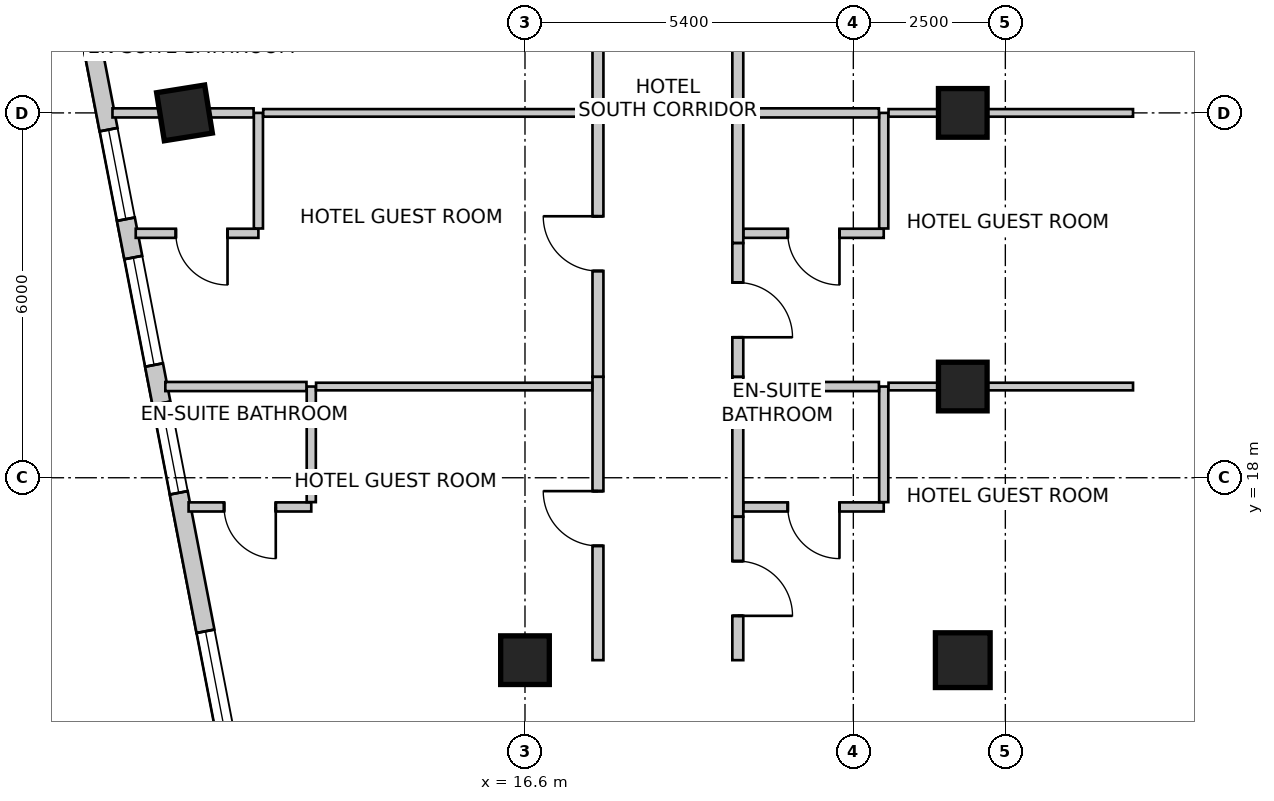
"""IFC4 building model, lengths in metres.
Left out: names, types, materials, properties, quantities, classifications, styles, units other than length and angle.
Written with IfcOpenShell. Run it as: python <this file> out.ifc"""

import sys

from ifc_helpers import new_model, si_unit, direction, frame, frame_2d, origin, origin_2d, place, context, subcontext, project, spatial, rectangle, extrude, source, transform, mapped, element, fill, save


model = new_model("IFC4")
c1 = context("Model", 3, precision=1e-05, world=origin(), true_north=direction((0.0, 1.0)))
c2 = subcontext(c1, "Body", "Model", "MODEL_VIEW")
j1 = project(units=[si_unit("LENGTHUNIT", "METRE"), si_unit("PLANEANGLEUNIT", "RADIAN")], contexts=[c1])
p1 = place(None, origin())
s1 = spatial("IfcSite", under=j1, at=p1, CompositionType="ELEMENT")
p2 = place(p1, origin())
s2 = spatial("IfcBuilding", under=s1, at=p2, CompositionType="ELEMENT")
p3 = place(p2, frame((0.0, 0.0, 128.6)))
s3 = spatial("IfcBuildingStorey", under=s2, at=p3, CompositionType="ELEMENT", Elevation=128.6)
m1 = source(origin(), c2, "Body", "SweptSolid", [
    extrude(rectangle(XDim=0.8, YDim=0.8, at=origin_2d()), origin(), (0.0, 0.0, 1.0), 3.6),
])
for number, where, z_axis, x_axis in (
    (1, (11.0, 24.0, 0.0), (0.0, 0.0, 1.0), (0.158, -0.987, 0.0)),
    (2, (23.8, 24.0, 0.0), (0.0, 0.0, 1.0), (1.0, 0.0, 0.0)),
    (3, (23.8, 19.5, 0.0), (0.0, 0.0, 1.0), (1.0, 0.0, 0.0)),
):
    element("IfcColumn", number, at=place(p3, frame(where, z_axis=z_axis, x_axis=x_axis)), inside=s3, PredefinedType="COLUMN", context=c2, shape_type="MappedRepresentation", body=[
        mapped(m1, transform((0.0, 0.0, 0.0), scale=1.0)),
    ])
m2 = source(origin(), c2, "Body", "SweptSolid", [
    extrude(rectangle(XDim=0.9, YDim=0.9, at=origin_2d()), origin(), (0.0, 0.0, 1.0), 3.6),
])
p4 = place(p3, frame((23.8, 15.0, 0.0), z_axis=(0.0, 0.0, 1.0), x_axis=(1.0, 0.0, 0.0)))
e4 = element("IfcColumn", 4, at=p4, inside=s3, PredefinedType="COLUMN", context=c2, shape_type="MappedRepresentation", body=[
    mapped(m2, transform((0.0, 0.0, 0.0), scale=1.0)),
])
p5 = place(p3, frame((16.6, 15.0, 0.0), z_axis=(0.0, 0.0, 1.0), x_axis=(1.0, 0.0, 0.0)))
e5 = element("IfcColumn", 5, at=p5, inside=s3, PredefinedType="COLUMN", context=c2, shape_type="MappedRepresentation", body=[
    mapped(m1, transform((0.0, 0.0, 0.0), scale=1.0)),
])
p6 = place(p3, frame((8.185, 31.834, 0.0), z_axis=(0.0, 0.0, 1.0), x_axis=(0.189707113148, -0.981840725994, 0.0)))
e6 = element("IfcWall", 6, at=p6, inside=s3, PredefinedType="SOLIDWALL", context=c2, shape_type="SweptSolid", body=[
    extrude(rectangle(XDim=21.221, YDim=0.3, at=frame_2d((10.611, 0.0))), origin(), (0.0, 0.0, 1.0), 3.35),
])
m3 = source(origin(), c2, "Body", "SweptSolid", [
    extrude(rectangle(XDim=1.5, YDim=1.8, at=frame_2d((0.75, 0.9))), frame((0.0, 0.16, 0.0), z_axis=(0.0, -1.0, 0.0), x_axis=(1.0, 0.0, 0.0)), (0.0, 0.0, 1.0), 0.32),
])
p7 = place(p6, frame((0.977, 0.0, 0.85)))
e7 = element("IfcOpeningElement", 7, at=p7, cuts=e6, PredefinedType="OPENING", context=c2, shape_type="MappedRepresentation", body=[
    mapped(m3, transform((0.0, 0.0, 0.0), scale=1.0)),
])
m4 = source(origin(), c2, "Body", "SweptSolid", [
    extrude(rectangle(XDim=2.4, YDim=2.2, at=frame_2d((1.2, 1.1))), frame((0.0, 0.16, 0.0), z_axis=(0.0, -1.0, 0.0), x_axis=(1.0, 0.0, 0.0)), (0.0, 0.0, 1.0), 0.32),
])
p8 = place(p6, frame((4.219, 0.0, 0.85)))
e8 = element("IfcOpeningElement", 8, at=p8, cuts=e6, PredefinedType="OPENING", context=c2, shape_type="MappedRepresentation", body=[
    mapped(m4, transform((0.0, 0.0, 0.0), scale=1.0)),
])
p9 = place(p6, frame((8.259, 0.0, 0.85)))
e9 = element("IfcOpeningElement", 9, at=p9, cuts=e6, PredefinedType="OPENING", context=c2, shape_type="MappedRepresentation", body=[
    mapped(m3, transform((0.0, 0.0, 0.0), scale=1.0)),
])
m5 = source(origin(), c2, "Body", "SweptSolid", [
    extrude(rectangle(XDim=1.8, YDim=2.1, at=frame_2d((0.9, 1.05))), frame((0.0, 0.16, 0.0), z_axis=(0.0, -1.0, 0.0), x_axis=(1.0, 0.0, 0.0)), (0.0, 0.0, 1.0), 0.32),
])
p10 = place(p6, frame((10.401, 0.0, 0.85)))
e10 = element("IfcOpeningElement", 10, at=p10, cuts=e6, PredefinedType="OPENING", context=c2, shape_type="MappedRepresentation", body=[
    mapped(m5, transform((0.0, 0.0, 0.0), scale=1.0)),
])
p11 = place(p6, frame((12.842, 0.0, 0.85)))
e11 = element("IfcOpeningElement", 11, at=p11, cuts=e6, PredefinedType="OPENING", context=c2, shape_type="MappedRepresentation", body=[
    mapped(m3, transform((0.0, 0.0, 0.0), scale=1.0)),
])
p12 = place(p6, frame((16.661, 0.0, 0.85)))
e12 = element("IfcOpeningElement", 12, at=p12, cuts=e6, PredefinedType="OPENING", context=c2, shape_type="MappedRepresentation", body=[
    mapped(m4, transform((0.0, 0.0, 0.0), scale=1.0)),
])
p13 = place(p3, frame((17.8, 15.0, 0.0), z_axis=(0.0, 0.0, 1.0), x_axis=(0.0, 1.0, 0.0)))
e13 = element("IfcWall", 13, at=p13, inside=s3, PredefinedType="PARTITIONING", context=c2, shape_type="SweptSolid", body=[
    extrude(rectangle(XDim=4.66, YDim=0.18, at=frame_2d((2.33, 0.0))), origin(), (0.0, 0.0, 1.0), 2.492),
])
m6 = source(origin(), c2, "Body", "SweptSolid", [
    extrude(rectangle(XDim=0.9, YDim=2.15, at=frame_2d((0.45, 1.075))), frame((0.0, 0.1, 0.0), z_axis=(0.0, -1.0, 0.0), x_axis=(1.0, 0.0, 0.0)), (0.0, 0.0, 1.0), 0.2),
])
p14 = place(p13, frame((1.88, 0.0, 0.0)))
e14 = element("IfcOpeningElement", 14, at=p14, cuts=e13, PredefinedType="OPENING", context=c2, shape_type="MappedRepresentation", body=[
    mapped(m6, transform((0.0, 0.0, 0.0), scale=1.0)),
])
p15 = place(p3, frame((20.1, 19.66, 0.0), z_axis=(0.0, 0.0, 1.0), x_axis=(0.0, -1.0, 0.0)))
e15 = element("IfcWall", 15, at=p15, inside=s3, PredefinedType="PARTITIONING", context=c2, shape_type="SweptSolid", body=[
    extrude(rectangle(XDim=2.3, YDim=0.18, at=frame_2d((1.15, 0.0))), origin(), (0.0, 0.0, 1.0), 3.35),
])
p16 = place(p3, frame((20.1, 17.358, 0.0), z_axis=(0.0, 0.0, 1.0), x_axis=(0.0, -1.0, 0.0)))
e16 = element("IfcWall", 16, at=p16, inside=s3, PredefinedType="PARTITIONING", context=c2, shape_type="SweptSolid", body=[
    extrude(rectangle(XDim=2.358, YDim=0.18, at=frame_2d((1.179, 0.0))), origin(), (0.0, 0.0, 1.0), 2.492),
])
p17 = place(p16, frame((0.729, 0.0, 0.0)))
e17 = element("IfcOpeningElement", 17, at=p17, cuts=e16, PredefinedType="OPENING", context=c2, shape_type="MappedRepresentation", body=[
    mapped(m6, transform((0.0, 0.0, 0.0), scale=1.0)),
])
p18 = place(p3, frame((17.8, 19.662, 0.0), z_axis=(0.0, 0.0, 1.0), x_axis=(0.0, 1.0, 0.0)))
e18 = element("IfcWall", 18, at=p18, inside=s3, PredefinedType="PARTITIONING", context=c2, shape_type="SweptSolid", body=[
    extrude(rectangle(XDim=4.498, YDim=0.18, at=frame_2d((2.249, 0.0))), origin(), (0.0, 0.0, 1.0), 2.803),
])
p19 = place(p18, frame((1.738, 0.0, 0.0)))
e19 = element("IfcOpeningElement", 19, at=p19, cuts=e18, PredefinedType="OPENING", context=c2, shape_type="MappedRepresentation", body=[
    mapped(m6, transform((0.0, 0.0, 0.0), scale=1.0)),
])
p20 = place(p3, frame((20.1, 24.16, 0.0), z_axis=(0.0, 0.0, 1.0), x_axis=(0.0, -1.0, 0.0)))
e20 = element("IfcWall", 20, at=p20, inside=s3, PredefinedType="PARTITIONING", context=c2, shape_type="SweptSolid", body=[
    extrude(rectangle(XDim=2.3, YDim=0.18, at=frame_2d((1.15, 0.0))), origin(), (0.0, 0.0, 1.0), 2.803),
])
p21 = place(p3, frame((20.1, 21.858, 0.0), z_axis=(0.0, 0.0, 1.0), x_axis=(0.0, -1.0, 0.0)))
e21 = element("IfcWall", 21, at=p21, inside=s3, PredefinedType="PARTITIONING", context=c2, shape_type="SweptSolid", body=[
    extrude(rectangle(XDim=2.196, YDim=0.18, at=frame_2d((1.098, 0.0))), origin(), (0.0, 0.0, 1.0), 2.879),
])
p22 = place(p21, frame((0.648, 0.0, 0.0)))
e22 = element("IfcOpeningElement", 22, at=p22, cuts=e21, PredefinedType="OPENING", context=c2, shape_type="MappedRepresentation", body=[
    mapped(m6, transform((0.0, 0.0, 0.0), scale=1.0)),
])
p23 = place(p3, frame((17.8, 24.162, 0.0), z_axis=(0.0, 0.0, 1.0), x_axis=(0.0, 1.0, 0.0)))
e23 = element("IfcWall", 23, at=p23, inside=s3, PredefinedType="PARTITIONING", context=c2, shape_type="SweptSolid", body=[
    extrude(rectangle(XDim=6.994, YDim=0.18, at=frame_2d((3.497, 0.0))), origin(), (0.0, 0.0, 1.0), 2.803),
])
p24 = place(p23, frame((3.047, 0.0, 0.0)))
e24 = element("IfcOpeningElement", 24, at=p24, cuts=e23, PredefinedType="OPENING", context=c2, shape_type="MappedRepresentation", body=[
    mapped(m6, transform((0.0, 0.0, 0.0), scale=1.0)),
])
p25 = place(p3, frame((20.1, 28.888, 0.0), z_axis=(0.0, 0.0, 1.0), x_axis=(0.0, -1.0, 0.0)))
e25 = element("IfcWall", 25, at=p25, inside=s3, PredefinedType="PARTITIONING", context=c2, shape_type="SweptSolid", body=[
    extrude(rectangle(XDim=4.726, YDim=0.18, at=frame_2d((2.363, 0.0))), origin(), (0.0, 0.0, 1.0), 2.803),
])
p26 = place(p25, frame((1.853, 0.0, 0.0)))
e26 = element("IfcOpeningElement", 26, at=p26, cuts=e25, PredefinedType="OPENING", context=c2, shape_type="MappedRepresentation", body=[
    mapped(m6, transform((0.0, 0.0, 0.0), scale=1.0)),
])
p27 = place(p3, frame((13.085, 17.52, 0.0), z_axis=(0.0, 0.0, 1.0), x_axis=(-1.0, 0.0, 0.0)))
e27 = element("IfcWall", 27, at=p27, inside=s3, PredefinedType="PARTITIONING", context=c2, shape_type="SweptSolid", body=[
    extrude(rectangle(XDim=2.018, YDim=0.15, at=frame_2d((1.009, 0.0))), origin(), (0.0, 0.0, 1.0), 3.35),
])
m7 = source(origin(), c2, "Body", "SweptSolid", [
    extrude(rectangle(XDim=0.85, YDim=2.15, at=frame_2d((0.425, 1.075))), frame((0.0, 0.085, 0.0), z_axis=(0.0, -1.0, 0.0), x_axis=(1.0, 0.0, 0.0)), (0.0, 0.0, 1.0), 0.17),
])
p28 = place(p27, frame((0.584, 0.0, 0.0)))
e28 = element("IfcOpeningElement", 28, at=p28, cuts=e27, PredefinedType="OPENING", context=c2, shape_type="MappedRepresentation", body=[
    mapped(m7, transform((0.0, 0.0, 0.0), scale=1.0)),
])
p29 = place(p3, frame((13.085, 19.5, 0.0), z_axis=(0.0, 0.0, 1.0), x_axis=(0.0, -1.0, 0.0)))
e29 = element("IfcWall", 29, at=p29, inside=s3, PredefinedType="PARTITIONING", context=c2, shape_type="SweptSolid", body=[
    extrude(rectangle(XDim=1.901, YDim=0.15, at=frame_2d((0.95, 0.0))), origin(), (0.0, 0.0, 1.0), 3.35),
])
p30 = place(p3, frame((10.685, 19.5, 0.0), z_axis=(0.0, 0.0, 1.0), x_axis=(1.0, 0.0, 0.0)))
e30 = element("IfcWall", 30, at=p30, inside=s3, PredefinedType="PARTITIONING", context=c2, shape_type="SweptSolid", body=[
    extrude(rectangle(XDim=2.321, YDim=0.15, at=frame_2d((1.161, 0.0))), origin(), (0.0, 0.0, 1.0), 3.35),
])
p31 = place(p3, frame((13.164, 19.5, 0.0), z_axis=(0.0, 0.0, 1.0), x_axis=(1.0, 0.0, 0.0)))
e31 = element("IfcWall", 31, at=p31, inside=s3, PredefinedType="PARTITIONING", context=c2, shape_type="SweptSolid", body=[
    extrude(rectangle(XDim=4.542, YDim=0.125, at=frame_2d((2.271, 0.0))), origin(), (0.0, 0.0, 1.0), 3.35),
])
p32 = place(p3, frame((22.5, 17.52, 0.0), z_axis=(0.0, 0.0, 1.0), x_axis=(-1.0, 0.0, 0.0)))
e32 = element("IfcWall", 32, at=p32, inside=s3, PredefinedType="PARTITIONING", context=c2, shape_type="SweptSolid", body=[
    extrude(rectangle(XDim=2.306, YDim=0.15, at=frame_2d((1.153, 0.0))), origin(), (0.0, 0.0, 1.0), 2.879),
])
p33 = place(p32, frame((0.728, 0.0, 0.0)))
e33 = element("IfcOpeningElement", 33, at=p33, cuts=e32, PredefinedType="OPENING", context=c2, shape_type="MappedRepresentation", body=[
    mapped(m7, transform((0.0, 0.0, 0.0), scale=1.0)),
])
p34 = place(p3, frame((22.5, 19.5, 0.0), z_axis=(0.0, 0.0, 1.0), x_axis=(0.0, -1.0, 0.0)))
e34 = element("IfcWall", 34, at=p34, inside=s3, PredefinedType="PARTITIONING", context=c2, shape_type="SweptSolid", body=[
    extrude(rectangle(XDim=1.901, YDim=0.15, at=frame_2d((0.95, 0.0))), origin(), (0.0, 0.0, 1.0), 2.879),
])
p35 = place(p3, frame((20.194, 19.5, 0.0), z_axis=(0.0, 0.0, 1.0), x_axis=(1.0, 0.0, 0.0)))
e35 = element("IfcWall", 35, at=p35, inside=s3, PredefinedType="PARTITIONING", context=c2, shape_type="SweptSolid", body=[
    extrude(rectangle(XDim=2.227, YDim=0.15, at=frame_2d((1.113, 0.0))), origin(), (0.0, 0.0, 1.0), 3.35),
])
p36 = place(p3, frame((22.579, 19.5, 0.0), z_axis=(0.0, 0.0, 1.0), x_axis=(1.0, 0.0, 0.0)))
e36 = element("IfcWall", 36, at=p36, inside=s3, PredefinedType="PARTITIONING", context=c2, shape_type="SweptSolid", body=[
    extrude(rectangle(XDim=4.021, YDim=0.125, at=frame_2d((2.01, 0.0))), origin(), (0.0, 0.0, 1.0), 2.492),
])
p37 = place(p3, frame((12.216, 22.02, 0.0), z_axis=(0.0, 0.0, 1.0), x_axis=(-1.0, 0.0, 0.0)))
e37 = element("IfcWall", 37, at=p37, inside=s3, PredefinedType="PARTITIONING", context=c2, shape_type="SweptSolid", body=[
    extrude(rectangle(XDim=2.018, YDim=0.15, at=frame_2d((1.009, 0.0))), origin(), (0.0, 0.0, 1.0), 3.35),
])
p38 = place(p37, frame((0.508, 0.0, 0.0)))
e38 = element("IfcOpeningElement", 38, at=p38, cuts=e37, PredefinedType="OPENING", context=c2, shape_type="MappedRepresentation", body=[
    mapped(m7, transform((0.0, 0.0, 0.0), scale=1.0)),
])
p39 = place(p3, frame((12.216, 24.0, 0.0), z_axis=(0.0, 0.0, 1.0), x_axis=(0.0, -1.0, 0.0)))
e39 = element("IfcWall", 39, at=p39, inside=s3, PredefinedType="PARTITIONING", context=c2, shape_type="SweptSolid", body=[
    extrude(rectangle(XDim=1.901, YDim=0.15, at=frame_2d((0.95, 0.0))), origin(), (0.0, 0.0, 1.0), 2.803),
])
p40 = place(p3, frame((9.816, 24.0, 0.0), z_axis=(0.0, 0.0, 1.0), x_axis=(1.0, 0.0, 0.0)))
e40 = element("IfcWall", 40, at=p40, inside=s3, PredefinedType="PARTITIONING", context=c2, shape_type="SweptSolid", body=[
    extrude(rectangle(XDim=2.321, YDim=0.15, at=frame_2d((1.161, 0.0))), origin(), (0.0, 0.0, 1.0), 2.492),
])
p41 = place(p3, frame((12.295, 24.0, 0.0), z_axis=(0.0, 0.0, 1.0), x_axis=(1.0, 0.0, 0.0)))
e41 = element("IfcWall", 41, at=p41, inside=s3, PredefinedType="PARTITIONING", context=c2, shape_type="SweptSolid", body=[
    extrude(rectangle(XDim=5.411, YDim=0.125, at=frame_2d((2.706, 0.0))), origin(), (0.0, 0.0, 1.0), 2.803),
])
p42 = place(p3, frame((22.5, 22.02, 0.0), z_axis=(0.0, 0.0, 1.0), x_axis=(-1.0, 0.0, 0.0)))
e42 = element("IfcWall", 42, at=p42, inside=s3, PredefinedType="PARTITIONING", context=c2, shape_type="SweptSolid", body=[
    extrude(rectangle(XDim=2.306, YDim=0.15, at=frame_2d((1.153, 0.0))), origin(), (0.0, 0.0, 1.0), 3.35),
])
p43 = place(p42, frame((0.728, 0.0, 0.0)))
e43 = element("IfcOpeningElement", 43, at=p43, cuts=e42, PredefinedType="OPENING", context=c2, shape_type="MappedRepresentation", body=[
    mapped(m7, transform((0.0, 0.0, 0.0), scale=1.0)),
])
p44 = place(p3, frame((22.5, 24.0, 0.0), z_axis=(0.0, 0.0, 1.0), x_axis=(0.0, -1.0, 0.0)))
e44 = element("IfcWall", 44, at=p44, inside=s3, PredefinedType="PARTITIONING", context=c2, shape_type="SweptSolid", body=[
    extrude(rectangle(XDim=1.901, YDim=0.15, at=frame_2d((0.95, 0.0))), origin(), (0.0, 0.0, 1.0), 2.803),
])
p45 = place(p3, frame((20.194, 24.0, 0.0), z_axis=(0.0, 0.0, 1.0), x_axis=(1.0, 0.0, 0.0)))
e45 = element("IfcWall", 45, at=p45, inside=s3, PredefinedType="PARTITIONING", context=c2, shape_type="SweptSolid", body=[
    extrude(rectangle(XDim=2.227, YDim=0.15, at=frame_2d((1.113, 0.0))), origin(), (0.0, 0.0, 1.0), 2.803),
])
p46 = place(p3, frame((22.579, 24.0, 0.0), z_axis=(0.0, 0.0, 1.0), x_axis=(1.0, 0.0, 0.0)))
e46 = element("IfcWall", 46, at=p46, inside=s3, PredefinedType="PARTITIONING", context=c2, shape_type="SweptSolid", body=[
    extrude(rectangle(XDim=4.021, YDim=0.125, at=frame_2d((2.01, 0.0))), origin(), (0.0, 0.0, 1.0), 2.492),
])
m8 = source(origin(), c2, "Body", "SweptSolid", [
    extrude(rectangle(XDim=1.5, YDim=1.8, at=frame_2d((0.75, 0.9))), frame((0.0, -0.015, 0.0), z_axis=(0.0, -1.0, 0.0), x_axis=(1.0, 0.0, 0.0)), (0.0, 0.0, 1.0), 0.06),
])
p47 = place(p9, origin())
e47 = element("IfcWindow", 47, at=p47, inside=s3, PartitioningType="SINGLE_PANEL", PredefinedType="WINDOW", context=c2, shape_type="MappedRepresentation", body=[
    mapped(m8, transform((0.0, 0.0, 0.0), scale=1.0)),
])
fill(e9, e47)
m9 = source(origin(), c2, "Body", "SweptSolid", [
    extrude(rectangle(XDim=1.8, YDim=2.1, at=frame_2d((0.9, 1.05))), frame((0.0, -0.015, 0.0), z_axis=(0.0, -1.0, 0.0), x_axis=(1.0, 0.0, 0.0)), (0.0, 0.0, 1.0), 0.06),
])
p48 = place(p10, origin())
e48 = element("IfcWindow", 48, at=p48, inside=s3, PartitioningType="SINGLE_PANEL", PredefinedType="WINDOW", context=c2, shape_type="MappedRepresentation", body=[
    mapped(m9, transform((0.0, 0.0, 0.0), scale=1.0)),
])
fill(e10, e48)
p49 = place(p11, origin())
e49 = element("IfcWindow", 49, at=p49, inside=s3, PartitioningType="SINGLE_PANEL", PredefinedType="WINDOW", context=c2, shape_type="MappedRepresentation", body=[
    mapped(m8, transform((0.0, 0.0, 0.0), scale=1.0)),
])
fill(e11, e49)
m10 = source(origin(), c2, "Body", "SweptSolid", [
    extrude(rectangle(XDim=2.4, YDim=2.2, at=frame_2d((1.2, 1.1))), frame((0.0, -0.015, 0.0), z_axis=(0.0, -1.0, 0.0), x_axis=(1.0, 0.0, 0.0)), (0.0, 0.0, 1.0), 0.06),
])
p50 = place(p12, origin())
e50 = element("IfcWindow", 50, at=p50, inside=s3, PartitioningType="SINGLE_PANEL", PredefinedType="WINDOW", context=c2, shape_type="MappedRepresentation", body=[
    mapped(m10, transform((0.0, 0.0, 0.0), scale=1.0)),
])
fill(e12, e50)
m11 = source(origin(), c2, "Body", "SweptSolid", [
    extrude(rectangle(XDim=0.85, YDim=2.15, at=frame_2d((0.425, 1.075))), frame((0.0, 0.025, 0.0), z_axis=(0.0, -1.0, 0.0), x_axis=(1.0, 0.0, 0.0)), (0.0, 0.0, 1.0), 0.05),
])
p51 = place(p28, origin())
e51 = element("IfcDoor", 51, at=p51, inside=s3, OperationType="SINGLE_SWING_LEFT", PredefinedType="DOOR", context=c2, shape_type="MappedRepresentation", body=[
    mapped(m11, transform((0.0, 0.0, 0.0), scale=1.0)),
])
fill(e28, e51)
m12 = source(origin(), c2, "Body", "SweptSolid", [
    extrude(rectangle(XDim=0.9, YDim=2.15, at=frame_2d((0.45, 1.075))), frame((0.0, 0.025, 0.0), z_axis=(0.0, -1.0, 0.0), x_axis=(1.0, 0.0, 0.0)), (0.0, 0.0, 1.0), 0.05),
])
p52 = place(p14, origin())
e52 = element("IfcDoor", 52, at=p52, inside=s3, OperationType="SINGLE_SWING_RIGHT", PredefinedType="DOOR", context=c2, shape_type="MappedRepresentation", body=[
    mapped(m12, transform((0.0, 0.0, 0.0), scale=1.0)),
])
fill(e14, e52)
p53 = place(p33, origin())
e53 = element("IfcDoor", 53, at=p53, inside=s3, OperationType="SINGLE_SWING_LEFT", PredefinedType="DOOR", context=c2, shape_type="MappedRepresentation", body=[
    mapped(m11, transform((0.0, 0.0, 0.0), scale=1.0)),
])
fill(e33, e53)
p54 = place(p17, origin())
e54 = element("IfcDoor", 54, at=p54, inside=s3, OperationType="SINGLE_SWING_RIGHT", PredefinedType="DOOR", context=c2, shape_type="MappedRepresentation", body=[
    mapped(m12, transform((0.0, 0.0, 0.0), scale=1.0)),
])
fill(e17, e54)
p55 = place(p38, origin())
e55 = element("IfcDoor", 55, at=p55, inside=s3, OperationType="SINGLE_SWING_LEFT", PredefinedType="DOOR", context=c2, shape_type="MappedRepresentation", body=[
    mapped(m11, transform((0.0, 0.0, 0.0), scale=1.0)),
])
fill(e38, e55)
p56 = place(p19, origin())
e56 = element("IfcDoor", 56, at=p56, inside=s3, OperationType="SINGLE_SWING_RIGHT", PredefinedType="DOOR", context=c2, shape_type="MappedRepresentation", body=[
    mapped(m12, transform((0.0, 0.0, 0.0), scale=1.0)),
])
fill(e19, e56)
p57 = place(p43, origin())
e57 = element("IfcDoor", 57, at=p57, inside=s3, OperationType="SINGLE_SWING_LEFT", PredefinedType="DOOR", context=c2, shape_type="MappedRepresentation", body=[
    mapped(m11, transform((0.0, 0.0, 0.0), scale=1.0)),
])
fill(e43, e57)
p58 = place(p22, origin())
e58 = element("IfcDoor", 58, at=p58, inside=s3, OperationType="SINGLE_SWING_RIGHT", PredefinedType="DOOR", context=c2, shape_type="MappedRepresentation", body=[
    mapped(m12, transform((0.0, 0.0, 0.0), scale=1.0)),
])
fill(e22, e58)
save(model, sys.argv[1])
